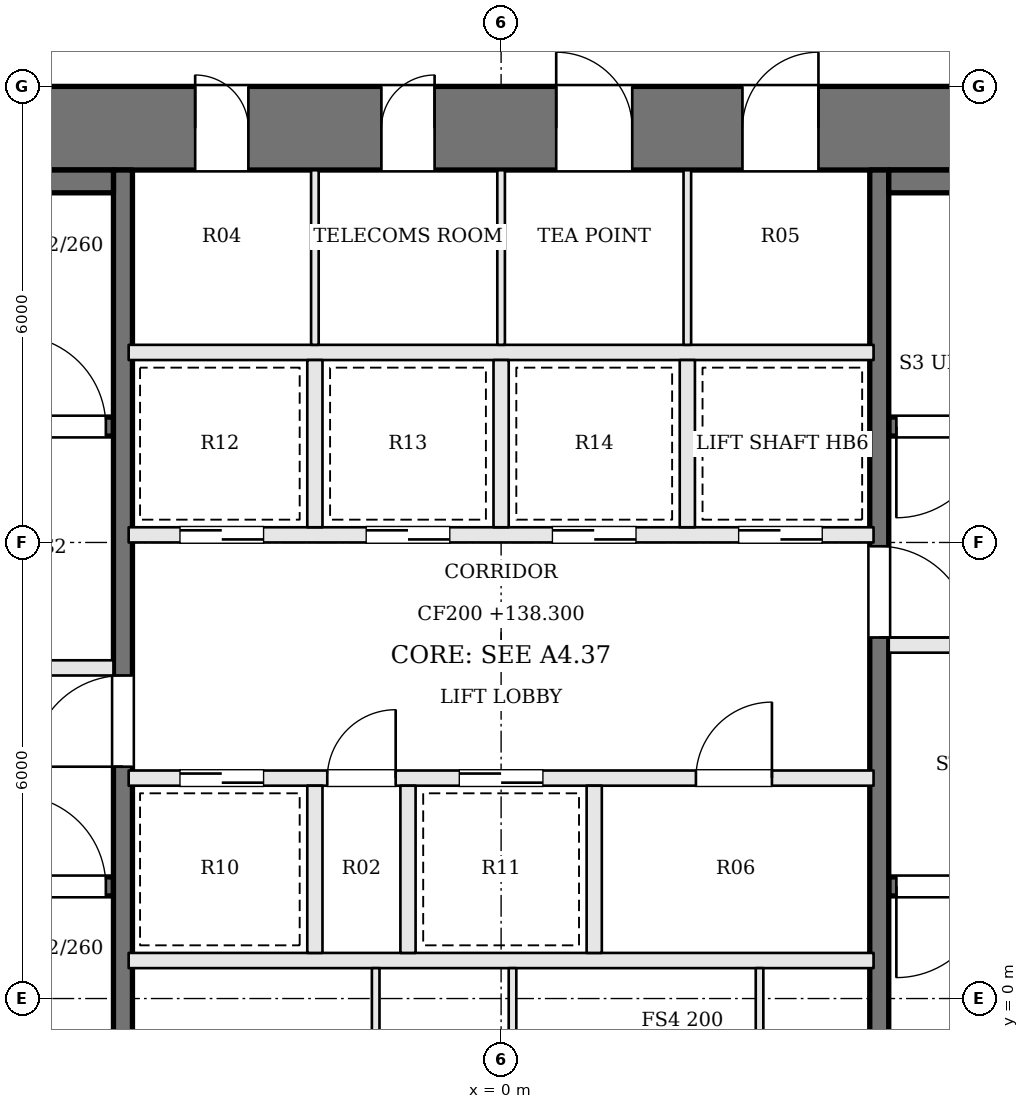
"""IFC4 building model, lengths in metres.
Left out: names, types, materials, properties, quantities, classifications, styles, units other than length and angle.
Written with IfcOpenShell. Run it as: python <this file> out.ifc"""

import sys

from ifc_helpers import new_model, si_unit, direction, frame, frame_2d, origin, place, context, subcontext, project, spatial, rectangle, extrude, element, fill, save


model = new_model("IFC4")
c1 = context("Model", 3, precision=1e-05, world=origin(), true_north=direction((0.0, 1.0)))
c2 = subcontext(c1, "Body", "Model", "MODEL_VIEW")
j1 = project(units=[si_unit("LENGTHUNIT", "METRE"), si_unit("PLANEANGLEUNIT", "RADIAN")], contexts=[c1])
p1 = place(None, origin())
s1 = spatial("IfcSite", under=j1, at=p1, CompositionType="ELEMENT")
p2 = place(p1, origin())
s2 = spatial("IfcBuilding", under=s1, at=p2, CompositionType="ELEMENT")
p3 = place(p2, frame((0.0, 0.0, 138.3)))
s3 = spatial("IfcBuildingStorey", under=s2, at=p3, CompositionType="ELEMENT", Elevation=138.3)
p4 = place(p3, frame((-13.0, 11.45, 0.0), z_axis=(0.0, 0.0, 1.0), x_axis=(1.0, 0.0, 0.0)))
e1 = element("IfcWall", 1, at=p4, inside=s3, PredefinedType="SHEAR", context=c2, shape_type="SweptSolid", body=[
    extrude(rectangle(XDim=26.0, YDim=1.1, at=frame_2d((13.0, 0.0))), origin(), (0.0, 0.0, 1.0), 3.9),
])
p5 = place(p4, frame((8.975, 0.0, 0.0)))
e2 = element("IfcOpeningElement", 2, at=p5, cuts=e1, PredefinedType="OPENING", context=c2, shape_type="SweptSolid", body=[
    extrude(rectangle(XDim=0.7, YDim=2.1, at=frame_2d((0.35, 1.05))), frame((0.0, 0.56, 0.0), z_axis=(0.0, -1.0, 0.0), x_axis=(1.0, 0.0, 0.0)), (0.0, 0.0, 1.0), 1.12),
])
p6 = place(p4, frame((11.425, 0.0, 0.0)))
e3 = element("IfcOpeningElement", 3, at=p6, cuts=e1, PredefinedType="OPENING", context=c2, shape_type="SweptSolid", body=[
    extrude(rectangle(XDim=0.7, YDim=2.1, at=frame_2d((0.35, 1.05))), frame((0.0, 0.56, 0.0), z_axis=(0.0, -1.0, 0.0), x_axis=(1.0, 0.0, 0.0)), (0.0, 0.0, 1.0), 1.12),
])
p7 = place(p4, frame((13.725, 0.0, 0.0)))
e4 = element("IfcOpeningElement", 4, at=p7, cuts=e1, PredefinedType="OPENING", context=c2, shape_type="SweptSolid", body=[
    extrude(rectangle(XDim=1.0, YDim=2.1, at=frame_2d((0.5, 1.05))), frame((0.0, 0.56, 0.0), z_axis=(0.0, -1.0, 0.0), x_axis=(1.0, 0.0, 0.0)), (0.0, 0.0, 1.0), 1.12),
])
p8 = place(p4, frame((16.175, 0.0, 0.0)))
e5 = element("IfcOpeningElement", 5, at=p8, cuts=e1, PredefinedType="OPENING", context=c2, shape_type="SweptSolid", body=[
    extrude(rectangle(XDim=1.0, YDim=2.1, at=frame_2d((0.5, 1.05))), frame((0.0, 0.56, 0.0), z_axis=(0.0, -1.0, 0.0), x_axis=(1.0, 0.0, 0.0)), (0.0, 0.0, 1.0), 1.12),
])
p9 = place(p3, frame((-11.9, 1.475, 0.0), z_axis=(0.0, 0.0, 1.0), x_axis=(1.0, 0.0, 0.0)))
e6 = element("IfcWall", 6, at=p9, inside=s3, PredefinedType="SOLIDWALL", context=c2, shape_type="SweptSolid", body=[
    extrude(rectangle(XDim=6.8, YDim=0.25, at=frame_2d((3.4, 0.0))), origin(), (0.0, 0.0, 1.0), 3.7),
])
p10 = place(p9, frame((5.5, 0.0, 0.0)))
e7 = element("IfcOpeningElement", 7, at=p10, cuts=e6, PredefinedType="OPENING", context=c2, shape_type="SweptSolid", body=[
    extrude(rectangle(XDim=1.2, YDim=2.1, at=frame_2d((0.6, 1.05))), frame((0.0, 0.135, 0.0), z_axis=(0.0, -1.0, 0.0), x_axis=(1.0, 0.0, 0.0)), (0.0, 0.0, 1.0), 0.27),
])
p11 = place(p3, frame((11.9, 7.525, 0.0), z_axis=(0.0, 0.0, 1.0), x_axis=(-1.0, 0.0, 0.0)))
e8 = element("IfcWall", 8, at=p11, inside=s3, PredefinedType="SOLIDWALL", context=c2, shape_type="SweptSolid", body=[
    extrude(rectangle(XDim=6.8, YDim=0.25, at=frame_2d((3.4, 0.0))), origin(), (0.0, 0.0, 1.0), 3.7),
])
p12 = place(p11, frame((5.5, 0.0, 0.0)))
e9 = element("IfcOpeningElement", 9, at=p12, cuts=e8, PredefinedType="OPENING", context=c2, shape_type="SweptSolid", body=[
    extrude(rectangle(XDim=1.2, YDim=2.1, at=frame_2d((0.6, 1.05))), frame((0.0, 0.135, 0.0), z_axis=(0.0, -1.0, 0.0), x_axis=(1.0, 0.0, 0.0)), (0.0, 0.0, 1.0), 0.27),
])
p13 = place(p3, frame((-11.9, 4.35, 0.0), z_axis=(0.0, 0.0, 1.0), x_axis=(1.0, 0.0, 0.0)))
e10 = element("IfcWall", 10, at=p13, inside=s3, PredefinedType="SOLIDWALL", context=c2, shape_type="SweptSolid", body=[
    extrude(rectangle(XDim=6.8, YDim=0.2, at=frame_2d((3.4, 0.0))), origin(), (0.0, 0.0, 1.0), 3.7),
])
p14 = place(p13, frame((4.1, 0.0, 0.0)))
e11 = element("IfcOpeningElement", 11, at=p14, cuts=e10, PredefinedType="OPENING", context=c2, shape_type="SweptSolid", body=[
    extrude(rectangle(XDim=1.2, YDim=2.1, at=frame_2d((0.6, 1.05))), frame((0.0, 0.11, 0.0), z_axis=(0.0, -1.0, 0.0), x_axis=(1.0, 0.0, 0.0)), (0.0, 0.0, 1.0), 0.22),
])
p15 = place(p13, frame((0.8, 0.0, 0.0)))
e12 = element("IfcOpeningElement", 12, at=p15, cuts=e10, PredefinedType="OPENING", context=c2, shape_type="SweptSolid", body=[
    extrude(rectangle(XDim=1.2, YDim=2.1, at=frame_2d((0.6, 1.05))), frame((0.0, 0.11, 0.0), z_axis=(0.0, -1.0, 0.0), x_axis=(1.0, 0.0, 0.0)), (0.0, 0.0, 1.0), 0.22),
])
p16 = place(p3, frame((11.9, 4.65, 0.0), z_axis=(0.0, 0.0, 1.0), x_axis=(-1.0, 0.0, 0.0)))
e13 = element("IfcWall", 13, at=p16, inside=s3, PredefinedType="SOLIDWALL", context=c2, shape_type="SweptSolid", body=[
    extrude(rectangle(XDim=6.8, YDim=0.2, at=frame_2d((3.4, 0.0))), origin(), (0.0, 0.0, 1.0), 3.7),
])
p17 = place(p16, frame((4.1, 0.0, 0.0)))
e14 = element("IfcOpeningElement", 14, at=p17, cuts=e13, PredefinedType="OPENING", context=c2, shape_type="SweptSolid", body=[
    extrude(rectangle(XDim=1.2, YDim=2.1, at=frame_2d((0.6, 1.05))), frame((0.0, 0.11, 0.0), z_axis=(0.0, -1.0, 0.0), x_axis=(1.0, 0.0, 0.0)), (0.0, 0.0, 1.0), 0.22),
])
p18 = place(p16, frame((0.8, 0.0, 0.0)))
e15 = element("IfcOpeningElement", 15, at=p18, cuts=e13, PredefinedType="OPENING", context=c2, shape_type="SweptSolid", body=[
    extrude(rectangle(XDim=1.2, YDim=2.1, at=frame_2d((0.6, 1.05))), frame((0.0, 0.11, 0.0), z_axis=(0.0, -1.0, 0.0), x_axis=(1.0, 0.0, 0.0)), (0.0, 0.0, 1.0), 0.22),
])
p19 = place(p3, frame((-11.9, 7.525, 0.0), z_axis=(0.0, 0.0, 1.0), x_axis=(1.0, 0.0, 0.0)))
e16 = element("IfcWall", 16, at=p19, inside=s3, PredefinedType="SOLIDWALL", context=c2, shape_type="SweptSolid", body=[
    extrude(rectangle(XDim=6.8, YDim=0.25, at=frame_2d((3.4, 0.0))), origin(), (0.0, 0.0, 1.0), 3.7),
])
p20 = place(p19, frame((5.5, 0.0, 0.0)))
e17 = element("IfcOpeningElement", 17, at=p20, cuts=e16, PredefinedType="OPENING", context=c2, shape_type="SweptSolid", body=[
    extrude(rectangle(XDim=1.2, YDim=2.1, at=frame_2d((0.6, 1.05))), frame((0.0, 0.135, 0.0), z_axis=(0.0, -1.0, 0.0), x_axis=(1.0, 0.0, 0.0)), (0.0, 0.0, 1.0), 0.27),
])
p21 = place(p3, frame((11.9, 1.475, 0.0), z_axis=(0.0, 0.0, 1.0), x_axis=(-1.0, 0.0, 0.0)))
e18 = element("IfcWall", 18, at=p21, inside=s3, PredefinedType="SOLIDWALL", context=c2, shape_type="SweptSolid", body=[
    extrude(rectangle(XDim=6.8, YDim=0.25, at=frame_2d((3.4, 0.0))), origin(), (0.0, 0.0, 1.0), 3.7),
])
p22 = place(p21, frame((5.5, 0.0, 0.0)))
e19 = element("IfcOpeningElement", 19, at=p22, cuts=e18, PredefinedType="OPENING", context=c2, shape_type="SweptSolid", body=[
    extrude(rectangle(XDim=1.2, YDim=2.1, at=frame_2d((0.6, 1.05))), frame((0.0, 0.135, 0.0), z_axis=(0.0, -1.0, 0.0), x_axis=(1.0, 0.0, 0.0)), (0.0, 0.0, 1.0), 0.27),
])
p23 = place(p3, frame((-4.975, -1.9, 0.0), z_axis=(0.0, 0.0, 1.0), x_axis=(0.0, 1.0, 0.0)))
e20 = element("IfcWall", 20, at=p23, inside=s3, PredefinedType="SOLIDWALL", context=c2, shape_type="SweptSolid", body=[
    extrude(rectangle(XDim=12.8, YDim=0.25, at=frame_2d((6.4, 0.0))), origin(), (0.0, 0.0, 1.0), 3.7),
])
p24 = place(p23, frame((4.95, 0.0, 0.0)))
e21 = element("IfcOpeningElement", 21, at=p24, cuts=e20, PredefinedType="OPENING", context=c2, shape_type="SweptSolid", body=[
    extrude(rectangle(XDim=1.2, YDim=2.1, at=frame_2d((0.6, 1.05))), frame((0.0, 0.135, 0.0), z_axis=(0.0, -1.0, 0.0), x_axis=(1.0, 0.0, 0.0)), (0.0, 0.0, 1.0), 0.27),
])
p25 = place(p3, frame((4.975, 10.9, 0.0), z_axis=(0.0, 0.0, 1.0), x_axis=(0.0, -1.0, 0.0)))
e22 = element("IfcWall", 22, at=p25, inside=s3, PredefinedType="SOLIDWALL", context=c2, shape_type="SweptSolid", body=[
    extrude(rectangle(XDim=12.8, YDim=0.25, at=frame_2d((6.4, 0.0))), origin(), (0.0, 0.0, 1.0), 3.7),
])
p26 = place(p25, frame((4.95, 0.0, 0.0)))
e23 = element("IfcOpeningElement", 23, at=p26, cuts=e22, PredefinedType="OPENING", context=c2, shape_type="SweptSolid", body=[
    extrude(rectangle(XDim=1.2, YDim=2.1, at=frame_2d((0.6, 1.05))), frame((0.0, 0.135, 0.0), z_axis=(0.0, -1.0, 0.0), x_axis=(1.0, 0.0, 0.0)), (0.0, 0.0, 1.0), 0.27),
])
for number, where, z_axis, x_axis in (
    (24, (-11.9, 10.75, 0.0), (0.0, 0.0, 1.0), (1.0, 0.0, 0.0)),
    (25, (11.9, 10.75, 0.0), (0.0, 0.0, 1.0), (-1.0, 0.0, 0.0)),
):
    element("IfcWall", number, at=place(p3, frame(where, z_axis=z_axis, x_axis=x_axis)), inside=s3, PredefinedType="SOLIDWALL", context=c2, shape_type="SweptSolid", body=[
        extrude(rectangle(XDim=6.8, YDim=0.3, at=frame_2d((3.4, 0.0))), origin(), (0.0, 0.0, 1.0), 3.7),
    ])
p27 = place(p3, frame((-4.9, 0.5, 0.0), z_axis=(0.0, 0.0, 1.0), x_axis=(1.0, 0.0, 0.0)))
e26 = element("IfcWall", 26, at=p27, inside=s3, PredefinedType="SOLIDWALL", context=c2, shape_type="SweptSolid", body=[
    extrude(rectangle(XDim=9.8, YDim=0.2, at=frame_2d((4.9, 0.0))), origin(), (0.0, 0.0, 1.0), 3.7),
])
p28 = place(p3, frame((-4.9, 2.9, 0.0), z_axis=(0.0, 0.0, 1.0), x_axis=(1.0, 0.0, 0.0)))
e27 = element("IfcWall", 27, at=p28, inside=s3, PredefinedType="SOLIDWALL", context=c2, shape_type="SweptSolid", body=[
    extrude(rectangle(XDim=9.8, YDim=0.2, at=frame_2d((4.9, 0.0))), origin(), (0.0, 0.0, 1.0), 3.7),
])
p29 = place(p28, frame((0.675, 0.0, 0.0)))
e28 = element("IfcOpeningElement", 28, at=p29, cuts=e27, PredefinedType="OPENING", context=c2, shape_type="SweptSolid", body=[
    extrude(rectangle(XDim=1.1, YDim=2.1, at=frame_2d((0.55, 1.05))), frame((0.0, 0.11, 0.0), z_axis=(0.0, -1.0, 0.0), x_axis=(1.0, 0.0, 0.0)), (0.0, 0.0, 1.0), 0.22),
])
p30 = place(p28, frame((2.613, 0.0, 0.0)))
e29 = element("IfcOpeningElement", 29, at=p30, cuts=e27, PredefinedType="OPENING", context=c2, shape_type="SweptSolid", body=[
    extrude(rectangle(XDim=0.9, YDim=2.1, at=frame_2d((0.45, 1.05))), frame((0.0, 0.11, 0.0), z_axis=(0.0, -1.0, 0.0), x_axis=(1.0, 0.0, 0.0)), (0.0, 0.0, 1.0), 0.22),
])
p31 = place(p28, frame((4.35, 0.0, 0.0)))
e30 = element("IfcOpeningElement", 30, at=p31, cuts=e27, PredefinedType="OPENING", context=c2, shape_type="SweptSolid", body=[
    extrude(rectangle(XDim=1.1, YDim=2.1, at=frame_2d((0.55, 1.05))), frame((0.0, 0.11, 0.0), z_axis=(0.0, -1.0, 0.0), x_axis=(1.0, 0.0, 0.0)), (0.0, 0.0, 1.0), 0.22),
])
p32 = place(p28, frame((7.463, 0.0, 0.0)))
e31 = element("IfcOpeningElement", 31, at=p32, cuts=e27, PredefinedType="OPENING", context=c2, shape_type="SweptSolid", body=[
    extrude(rectangle(XDim=1.0, YDim=2.1, at=frame_2d((0.5, 1.05))), frame((0.0, 0.11, 0.0), z_axis=(0.0, -1.0, 0.0), x_axis=(1.0, 0.0, 0.0)), (0.0, 0.0, 1.0), 0.22),
])
p33 = place(p3, frame((-4.9, 6.1, 0.0), z_axis=(0.0, 0.0, 1.0), x_axis=(1.0, 0.0, 0.0)))
e32 = element("IfcWall", 32, at=p33, inside=s3, PredefinedType="SOLIDWALL", context=c2, shape_type="SweptSolid", body=[
    extrude(rectangle(XDim=9.8, YDim=0.2, at=frame_2d((4.9, 0.0))), origin(), (0.0, 0.0, 1.0), 3.7),
])
p34 = place(p33, frame((0.675, 0.0, 0.0)))
e33 = element("IfcOpeningElement", 33, at=p34, cuts=e32, PredefinedType="OPENING", context=c2, shape_type="SweptSolid", body=[
    extrude(rectangle(XDim=1.1, YDim=2.1, at=frame_2d((0.55, 1.05))), frame((0.0, 0.11, 0.0), z_axis=(0.0, -1.0, 0.0), x_axis=(1.0, 0.0, 0.0)), (0.0, 0.0, 1.0), 0.22),
])
p35 = place(p33, frame((3.125, 0.0, 0.0)))
e34 = element("IfcOpeningElement", 34, at=p35, cuts=e32, PredefinedType="OPENING", context=c2, shape_type="SweptSolid", body=[
    extrude(rectangle(XDim=1.1, YDim=2.1, at=frame_2d((0.55, 1.05))), frame((0.0, 0.11, 0.0), z_axis=(0.0, -1.0, 0.0), x_axis=(1.0, 0.0, 0.0)), (0.0, 0.0, 1.0), 0.22),
])
p36 = place(p33, frame((5.575, 0.0, 0.0)))
e35 = element("IfcOpeningElement", 35, at=p36, cuts=e32, PredefinedType="OPENING", context=c2, shape_type="SweptSolid", body=[
    extrude(rectangle(XDim=1.1, YDim=2.1, at=frame_2d((0.55, 1.05))), frame((0.0, 0.11, 0.0), z_axis=(0.0, -1.0, 0.0), x_axis=(1.0, 0.0, 0.0)), (0.0, 0.0, 1.0), 0.22),
])
p37 = place(p33, frame((8.025, 0.0, 0.0)))
e36 = element("IfcOpeningElement", 36, at=p37, cuts=e32, PredefinedType="OPENING", context=c2, shape_type="SweptSolid", body=[
    extrude(rectangle(XDim=1.1, YDim=2.1, at=frame_2d((0.55, 1.05))), frame((0.0, 0.11, 0.0), z_axis=(0.0, -1.0, 0.0), x_axis=(1.0, 0.0, 0.0)), (0.0, 0.0, 1.0), 0.22),
])
p38 = place(p3, frame((-4.9, 8.5, 0.0), z_axis=(0.0, 0.0, 1.0), x_axis=(1.0, 0.0, 0.0)))
e37 = element("IfcWall", 37, at=p38, inside=s3, PredefinedType="SOLIDWALL", context=c2, shape_type="SweptSolid", body=[
    extrude(rectangle(XDim=9.8, YDim=0.2, at=frame_2d((4.9, 0.0))), origin(), (0.0, 0.0, 1.0), 3.7),
])
for number, where, z_axis, x_axis in (
    (38, (-2.45, 0.6, 0.0), (0.0, 0.0, 1.0), (0.0, 1.0, 0.0)),
    (39, (-1.225, 0.6, 0.0), (0.0, 0.0, 1.0), (0.0, 1.0, 0.0)),
    (40, (1.225, 0.6, 0.0), (0.0, 0.0, 1.0), (0.0, 1.0, 0.0)),
    (41, (-2.45, 6.2, 0.0), (0.0, 0.0, 1.0), (0.0, 1.0, 0.0)),
    (42, (0.0, 6.2, 0.0), (0.0, 0.0, 1.0), (0.0, 1.0, 0.0)),
    (43, (2.45, 6.2, 0.0), (0.0, 0.0, 1.0), (0.0, 1.0, 0.0)),
):
    element("IfcWall", number, at=place(p3, frame(where, z_axis=z_axis, x_axis=x_axis)), inside=s3, PredefinedType="SOLIDWALL", context=c2, shape_type="SweptSolid", body=[
        extrude(rectangle(XDim=2.2, YDim=0.2, at=frame_2d((1.1, 0.0))), origin(), (0.0, 0.0, 1.0), 3.7),
    ])
for number, where, z_axis, x_axis in (
    (44, (-1.65, -1.9, 0.0), (0.0, 0.0, 1.0), (0.0, 1.0, 0.0)),
    (45, (0.15, -1.9, 0.0), (0.0, 0.0, 1.0), (0.0, 1.0, 0.0)),
    (46, (3.4, -1.9, 0.0), (0.0, 0.0, 1.0), (0.0, 1.0, 0.0)),
    (47, (-2.45, 8.6, 0.0), (0.0, 0.0, 1.0), (0.0, 1.0, 0.0)),
    (48, (0.0, 8.6, 0.0), (0.0, 0.0, 1.0), (0.0, 1.0, 0.0)),
    (49, (2.45, 8.6, 0.0), (0.0, 0.0, 1.0), (0.0, 1.0, 0.0)),
):
    element("IfcWall", number, at=place(p3, frame(where, z_axis=z_axis, x_axis=x_axis)), inside=s3, PredefinedType="PARTITIONING", context=c2, shape_type="SweptSolid", body=[
        extrude(rectangle(XDim=2.3, YDim=0.1, at=frame_2d((1.15, 0.0))), origin(), (0.0, 0.0, 1.0), 3.7),
    ])
p39 = place(p24, origin())
e50 = element("IfcDoor", 50, at=p39, inside=s3, OperationType="SINGLE_SWING_LEFT", PredefinedType="DOOR", context=c2, shape_type="SweptSolid", body=[
    extrude(rectangle(XDim=1.2, YDim=2.1, at=frame_2d((0.6, 1.05))), frame((0.0, 0.025, 0.0), z_axis=(0.0, -1.0, 0.0), x_axis=(1.0, 0.0, 0.0)), (0.0, 0.0, 1.0), 0.05),
])
fill(e21, e50)
p40 = place(p26, origin())
e51 = element("IfcDoor", 51, at=p40, inside=s3, OperationType="SINGLE_SWING_RIGHT", PredefinedType="DOOR", context=c2, shape_type="SweptSolid", body=[
    extrude(rectangle(XDim=1.2, YDim=2.1, at=frame_2d((0.6, 1.05))), frame((0.0, 0.025, 0.0), z_axis=(0.0, -1.0, 0.0), x_axis=(1.0, 0.0, 0.0)), (0.0, 0.0, 1.0), 0.05),
])
fill(e23, e51)
p41 = place(p10, origin())
e52 = element("IfcDoor", 52, at=p41, inside=s3, OperationType="SINGLE_SWING_LEFT", PredefinedType="DOOR", context=c2, shape_type="SweptSolid", body=[
    extrude(rectangle(XDim=1.2, YDim=2.1, at=frame_2d((0.6, 1.05))), frame((0.0, 0.025, 0.0), z_axis=(0.0, -1.0, 0.0), x_axis=(1.0, 0.0, 0.0)), (0.0, 0.0, 1.0), 0.05),
])
fill(e7, e52)
p42 = place(p12, origin())
e53 = element("IfcDoor", 53, at=p42, inside=s3, OperationType="SINGLE_SWING_RIGHT", PredefinedType="DOOR", context=c2, shape_type="SweptSolid", body=[
    extrude(rectangle(XDim=1.2, YDim=2.1, at=frame_2d((0.6, 1.05))), frame((0.0, 0.025, 0.0), z_axis=(0.0, -1.0, 0.0), x_axis=(1.0, 0.0, 0.0)), (0.0, 0.0, 1.0), 0.05),
])
fill(e9, e53)
p43 = place(p20, origin())
e54 = element("IfcDoor", 54, at=p43, inside=s3, OperationType="SINGLE_SWING_LEFT", PredefinedType="DOOR", context=c2, shape_type="SweptSolid", body=[
    extrude(rectangle(XDim=1.2, YDim=2.1, at=frame_2d((0.6, 1.05))), frame((0.0, 0.025, 0.0), z_axis=(0.0, -1.0, 0.0), x_axis=(1.0, 0.0, 0.0)), (0.0, 0.0, 1.0), 0.05),
])
fill(e17, e54)
p44 = place(p22, origin())
e55 = element("IfcDoor", 55, at=p44, inside=s3, OperationType="SINGLE_SWING_RIGHT", PredefinedType="DOOR", context=c2, shape_type="SweptSolid", body=[
    extrude(rectangle(XDim=1.2, YDim=2.1, at=frame_2d((0.6, 1.05))), frame((0.0, 0.025, 0.0), z_axis=(0.0, -1.0, 0.0), x_axis=(1.0, 0.0, 0.0)), (0.0, 0.0, 1.0), 0.05),
])
fill(e19, e55)
p45 = place(p29, origin())
e56 = element("IfcDoor", 56, at=p45, inside=s3, OperationType="SLIDING_TO_RIGHT", PredefinedType="DOOR", context=c2, shape_type="SweptSolid", body=[
    extrude(rectangle(XDim=1.1, YDim=2.1, at=frame_2d((0.55, 1.05))), frame((0.0, 0.025, 0.0), z_axis=(0.0, -1.0, 0.0), x_axis=(1.0, 0.0, 0.0)), (0.0, 0.0, 1.0), 0.05),
])
fill(e28, e56)
p46 = place(p30, origin())
e57 = element("IfcDoor", 57, at=p46, inside=s3, OperationType="SINGLE_SWING_RIGHT", PredefinedType="DOOR", context=c2, shape_type="SweptSolid", body=[
    extrude(rectangle(XDim=0.9, YDim=2.1, at=frame_2d((0.45, 1.05))), frame((0.0, 0.025, 0.0), z_axis=(0.0, -1.0, 0.0), x_axis=(1.0, 0.0, 0.0)), (0.0, 0.0, 1.0), 0.05),
])
fill(e29, e57)
p47 = place(p31, origin())
e58 = element("IfcDoor", 58, at=p47, inside=s3, OperationType="SLIDING_TO_LEFT", PredefinedType="DOOR", context=c2, shape_type="SweptSolid", body=[
    extrude(rectangle(XDim=1.1, YDim=2.1, at=frame_2d((0.55, 1.05))), frame((0.0, 0.025, 0.0), z_axis=(0.0, -1.0, 0.0), x_axis=(1.0, 0.0, 0.0)), (0.0, 0.0, 1.0), 0.05),
])
fill(e30, e58)
p48 = place(p32, origin())
e59 = element("IfcDoor", 59, at=p48, inside=s3, OperationType="SINGLE_SWING_RIGHT", PredefinedType="DOOR", context=c2, shape_type="SweptSolid", body=[
    extrude(rectangle(XDim=1.0, YDim=2.1, at=frame_2d((0.5, 1.05))), frame((0.0, 0.025, 0.0), z_axis=(0.0, -1.0, 0.0), x_axis=(1.0, 0.0, 0.0)), (0.0, 0.0, 1.0), 0.05),
])
fill(e31, e59)
p49 = place(p34, origin())
e60 = element("IfcDoor", 60, at=p49, inside=s3, OperationType="SLIDING_TO_RIGHT", PredefinedType="DOOR", context=c2, shape_type="SweptSolid", body=[
    extrude(rectangle(XDim=1.1, YDim=2.1, at=frame_2d((0.55, 1.05))), frame((0.0, 0.025, 0.0), z_axis=(0.0, -1.0, 0.0), x_axis=(1.0, 0.0, 0.0)), (0.0, 0.0, 1.0), 0.05),
])
fill(e33, e60)
p50 = place(p35, origin())
e61 = element("IfcDoor", 61, at=p50, inside=s3, OperationType="SLIDING_TO_LEFT", PredefinedType="DOOR", context=c2, shape_type="SweptSolid", body=[
    extrude(rectangle(XDim=1.1, YDim=2.1, at=frame_2d((0.55, 1.05))), frame((0.0, 0.025, 0.0), z_axis=(0.0, -1.0, 0.0), x_axis=(1.0, 0.0, 0.0)), (0.0, 0.0, 1.0), 0.05),
])
fill(e34, e61)
p51 = place(p36, origin())
e62 = element("IfcDoor", 62, at=p51, inside=s3, OperationType="SLIDING_TO_RIGHT", PredefinedType="DOOR", context=c2, shape_type="SweptSolid", body=[
    extrude(rectangle(XDim=1.1, YDim=2.1, at=frame_2d((0.55, 1.05))), frame((0.0, 0.025, 0.0), z_axis=(0.0, -1.0, 0.0), x_axis=(1.0, 0.0, 0.0)), (0.0, 0.0, 1.0), 0.05),
])
fill(e35, e62)
p52 = place(p37, origin())
e63 = element("IfcDoor", 63, at=p52, inside=s3, OperationType="SLIDING_TO_LEFT", PredefinedType="DOOR", context=c2, shape_type="SweptSolid", body=[
    extrude(rectangle(XDim=1.1, YDim=2.1, at=frame_2d((0.55, 1.05))), frame((0.0, 0.025, 0.0), z_axis=(0.0, -1.0, 0.0), x_axis=(1.0, 0.0, 0.0)), (0.0, 0.0, 1.0), 0.05),
])
fill(e36, e63)
p53 = place(p5, origin())
e64 = element("IfcDoor", 64, at=p53, inside=s3, OperationType="SINGLE_SWING_LEFT", PredefinedType="DOOR", context=c2, shape_type="SweptSolid", body=[
    extrude(rectangle(XDim=0.7, YDim=2.1, at=frame_2d((0.35, 1.05))), frame((0.0, 0.025, 0.0), z_axis=(0.0, -1.0, 0.0), x_axis=(1.0, 0.0, 0.0)), (0.0, 0.0, 1.0), 0.05),
])
fill(e2, e64)
p54 = place(p6, origin())
e65 = element("IfcDoor", 65, at=p54, inside=s3, OperationType="SINGLE_SWING_RIGHT", PredefinedType="DOOR", context=c2, shape_type="SweptSolid", body=[
    extrude(rectangle(XDim=0.7, YDim=2.1, at=frame_2d((0.35, 1.05))), frame((0.0, 0.025, 0.0), z_axis=(0.0, -1.0, 0.0), x_axis=(1.0, 0.0, 0.0)), (0.0, 0.0, 1.0), 0.05),
])
fill(e3, e65)
p55 = place(p7, origin())
e66 = element("IfcDoor", 66, at=p55, inside=s3, OperationType="SINGLE_SWING_LEFT", PredefinedType="DOOR", context=c2, shape_type="SweptSolid", body=[
    extrude(rectangle(XDim=1.0, YDim=2.1, at=frame_2d((0.5, 1.05))), frame((0.0, 0.025, 0.0), z_axis=(0.0, -1.0, 0.0), x_axis=(1.0, 0.0, 0.0)), (0.0, 0.0, 1.0), 0.05),
])
fill(e4, e66)
p56 = place(p8, origin())
e67 = element("IfcDoor", 67, at=p56, inside=s3, OperationType="SINGLE_SWING_RIGHT", PredefinedType="DOOR", context=c2, shape_type="SweptSolid", body=[
    extrude(rectangle(XDim=1.0, YDim=2.1, at=frame_2d((0.5, 1.05))), frame((0.0, 0.025, 0.0), z_axis=(0.0, -1.0, 0.0), x_axis=(1.0, 0.0, 0.0)), (0.0, 0.0, 1.0), 0.05),
])
fill(e5, e67)
save(model, sys.argv[1])
